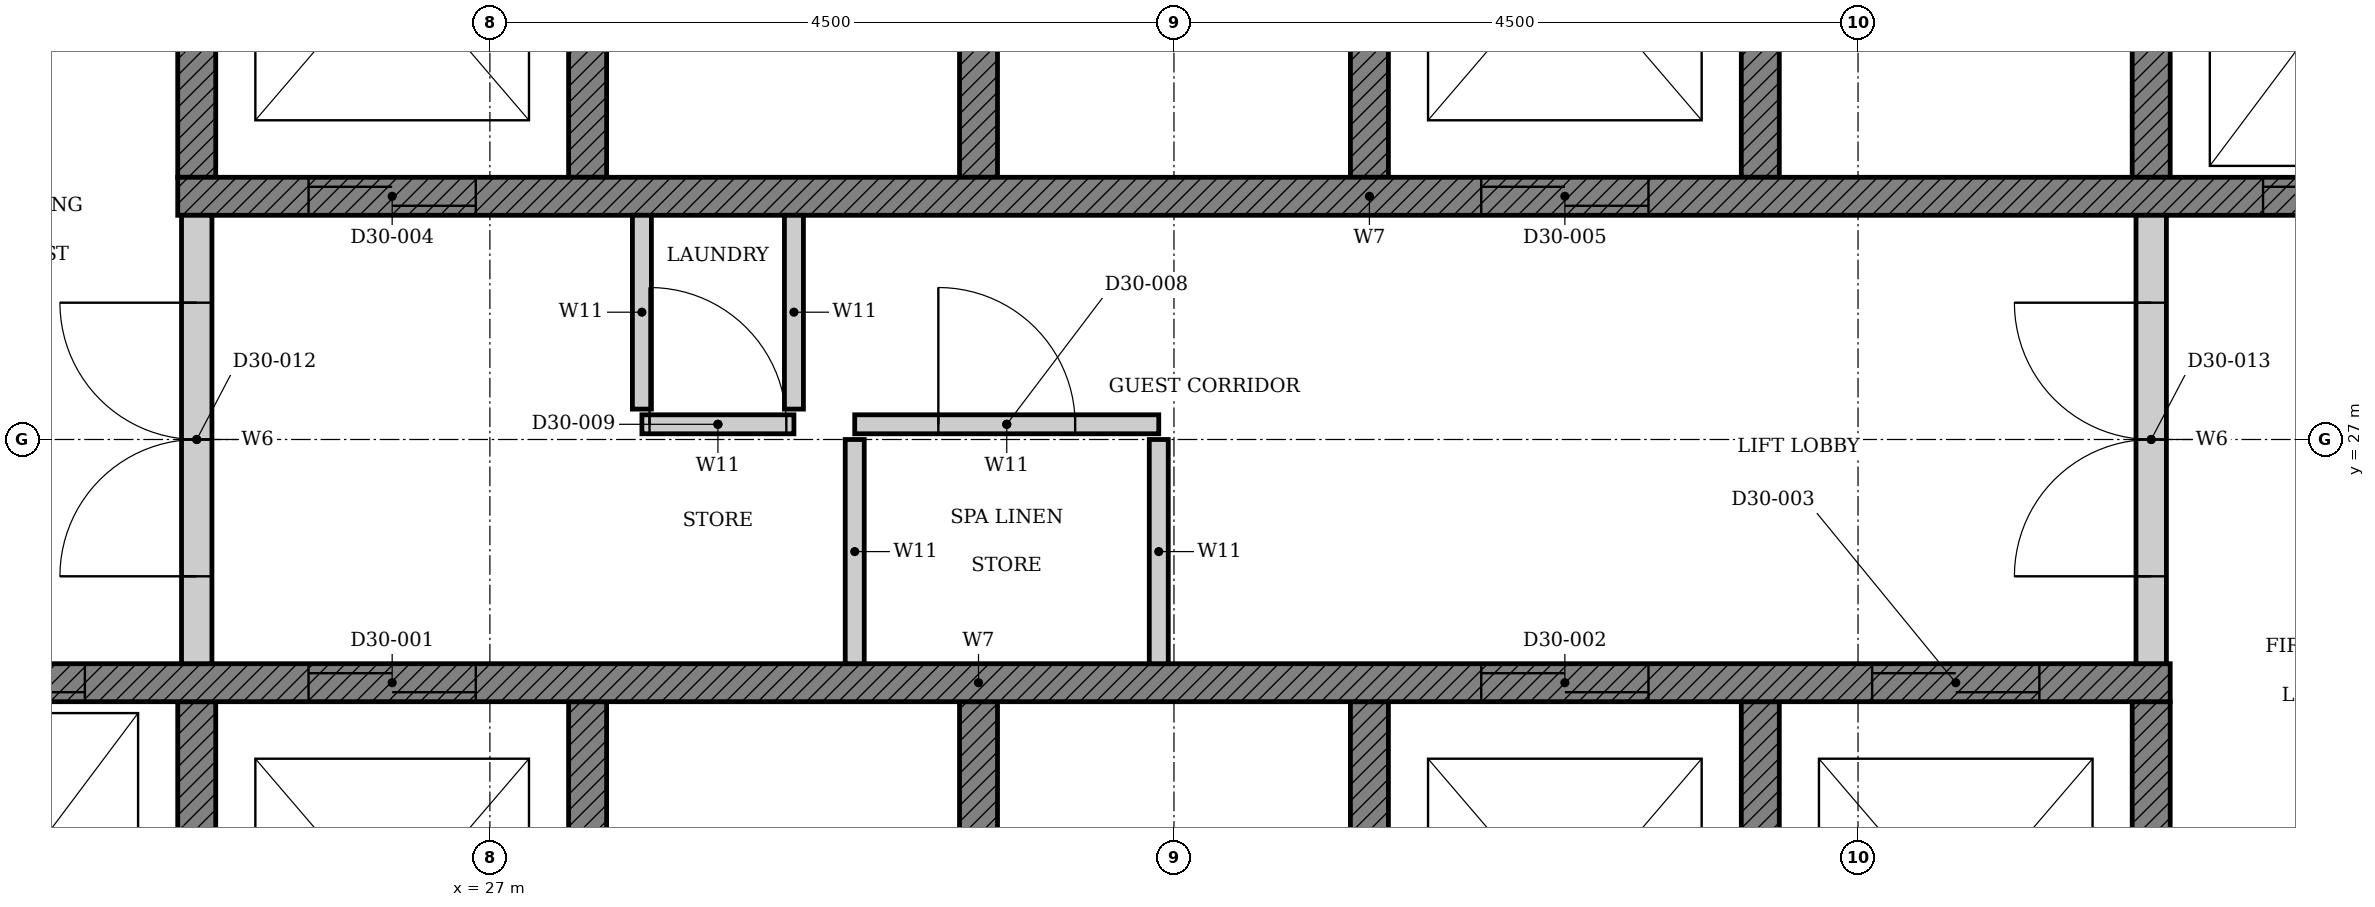
"""IFC4 building model, lengths in metres.
Left out: names, types, materials, properties, quantities, classifications, styles, units other than length and angle.
Written with IfcOpenShell. Run it as: python <this file> out.ifc"""

import sys

from ifc_helpers import new_model, si_unit, direction, frame, frame_2d, origin, place, context, subcontext, project, spatial, polyline, rectangle, outline, extrude, element, fill, save


model = new_model("IFC4")
c1 = context("Model", 3, precision=1e-05, world=origin(), true_north=direction((0.0, 1.0)))
c2 = subcontext(c1, "Body", "Model", "MODEL_VIEW")
j1 = project(units=[si_unit("LENGTHUNIT", "METRE"), si_unit("PLANEANGLEUNIT", "RADIAN")], contexts=[c1])
p1 = place(None, origin())
s1 = spatial("IfcSite", under=j1, at=p1, CompositionType="ELEMENT")
p2 = place(p1, origin())
s2 = spatial("IfcBuilding", under=s1, at=p2, CompositionType="ELEMENT")
p3 = place(p2, frame((0.0, 0.0, 122.4)))
s3 = spatial("IfcBuildingStorey", under=s2, at=p3, CompositionType="ELEMENT", Elevation=122.4)
p4 = place(p3, origin())
e1 = element("IfcWall", 1, at=p4, inside=s3, PredefinedType="SHEAR", context=c2, shape_type="SweptSolid", body=[
    extrude(outline(polyline([(22.375, 22.35), (38.053, 22.35), (38.053, 25.275), (37.803, 25.275), (37.803, 22.65), (35.482, 22.65), (35.482, 25.275), (35.232, 25.275), (35.232, 22.65), (32.911, 22.65), (32.911, 25.275), (32.661, 25.275), (32.661, 22.65), (30.339, 22.65), (30.339, 25.275), (30.089, 25.275), (30.089, 22.65), (27.768, 22.65), (27.768, 25.275), (27.518, 25.275), (27.518, 22.65), (25.197, 22.65), (25.197, 25.275), (24.947, 25.275), (24.947, 22.65), (22.625, 22.65), (22.625, 25.275), (22.375, 25.275), (22.375, 22.35)])), origin(), (0.0, 0.0, 1.0), 3.3),
])
p5 = place(p3, origin())
e2 = element("IfcWall", 2, at=p5, inside=s3, PredefinedType="SHEAR", context=c2, shape_type="SweptSolid", body=[
    extrude(outline(polyline([(24.947, 28.725), (25.197, 28.725), (25.197, 31.35), (27.518, 31.35), (27.518, 28.725), (27.768, 28.725), (27.768, 31.35), (30.089, 31.35), (30.089, 28.725), (30.339, 28.725), (30.339, 31.35), (32.661, 31.35), (32.661, 28.725), (32.911, 28.725), (32.911, 31.35), (35.232, 31.35), (35.232, 28.725), (35.482, 28.725), (35.482, 31.35), (37.803, 31.35), (37.803, 28.725), (38.053, 28.725), (38.053, 31.35), (40.375, 31.35), (40.375, 28.725), (40.625, 28.725), (40.625, 31.65), (24.947, 31.65), (24.947, 28.725)])), origin(), (0.0, 0.0, 1.0), 3.3),
])
p6 = place(p3, frame((22.375, 25.4, 0.0), z_axis=(0.0, 0.0, 1.0), x_axis=(1.0, 0.0, 0.0)))
e3 = element("IfcWall", 3, at=p6, inside=s3, PredefinedType="SHEAR", context=c2, shape_type="SweptSolid", body=[
    extrude(rectangle(XDim=15.678, YDim=0.25, at=frame_2d((7.839, 0.0))), origin(), (0.0, 0.0, 1.0), 3.3),
])
p7 = place(p6, frame((3.432, 0.0, 0.0)))
e4 = element("IfcOpeningElement", 4, at=p7, cuts=e3, PredefinedType="OPENING", context=c2, shape_type="SweptSolid", body=[
    extrude(rectangle(XDim=1.1, YDim=2.1, at=frame_2d((0.55, 1.05))), frame((0.0, 0.135, 0.0), z_axis=(0.0, -1.0, 0.0), x_axis=(1.0, 0.0, 0.0)), (0.0, 0.0, 1.0), 0.27),
])
p8 = place(p6, frame((11.146, 0.0, 0.0)))
e5 = element("IfcOpeningElement", 5, at=p8, cuts=e3, PredefinedType="OPENING", context=c2, shape_type="SweptSolid", body=[
    extrude(rectangle(XDim=1.1, YDim=2.1, at=frame_2d((0.55, 1.05))), frame((0.0, 0.135, 0.0), z_axis=(0.0, -1.0, 0.0), x_axis=(1.0, 0.0, 0.0)), (0.0, 0.0, 1.0), 0.27),
])
p9 = place(p6, frame((13.718, 0.0, 0.0)))
e6 = element("IfcOpeningElement", 6, at=p9, cuts=e3, PredefinedType="OPENING", context=c2, shape_type="SweptSolid", body=[
    extrude(rectangle(XDim=1.1, YDim=2.1, at=frame_2d((0.55, 1.05))), frame((0.0, 0.135, 0.0), z_axis=(0.0, -1.0, 0.0), x_axis=(1.0, 0.0, 0.0)), (0.0, 0.0, 1.0), 0.27),
])
p10 = place(p6, frame((0.861, 0.0, 0.0)))
e7 = element("IfcOpeningElement", 7, at=p10, cuts=e3, PredefinedType="OPENING", context=c2, shape_type="SweptSolid", body=[
    extrude(rectangle(XDim=1.1, YDim=2.1, at=frame_2d((0.55, 1.05))), frame((0.0, 0.135, 0.0), z_axis=(0.0, -1.0, 0.0), x_axis=(1.0, 0.0, 0.0)), (0.0, 0.0, 1.0), 0.27),
])
p11 = place(p3, frame((24.947, 28.6, 0.0), z_axis=(0.0, 0.0, 1.0), x_axis=(1.0, 0.0, 0.0)))
e8 = element("IfcWall", 8, at=p11, inside=s3, PredefinedType="SHEAR", context=c2, shape_type="SweptSolid", body=[
    extrude(rectangle(XDim=15.678, YDim=0.25, at=frame_2d((7.839, 0.0))), origin(), (0.0, 0.0, 1.0), 3.3),
])
p12 = place(p11, frame((0.861, 0.0, 0.0)))
e9 = element("IfcOpeningElement", 9, at=p12, cuts=e8, PredefinedType="OPENING", context=c2, shape_type="SweptSolid", body=[
    extrude(rectangle(XDim=1.1, YDim=2.1, at=frame_2d((0.55, 1.05))), frame((0.0, 0.135, 0.0), z_axis=(0.0, -1.0, 0.0), x_axis=(1.0, 0.0, 0.0)), (0.0, 0.0, 1.0), 0.27),
])
p13 = place(p11, frame((8.575, 0.0, 0.0)))
e10 = element("IfcOpeningElement", 10, at=p13, cuts=e8, PredefinedType="OPENING", context=c2, shape_type="SweptSolid", body=[
    extrude(rectangle(XDim=1.1, YDim=2.1, at=frame_2d((0.55, 1.05))), frame((0.0, 0.135, 0.0), z_axis=(0.0, -1.0, 0.0), x_axis=(1.0, 0.0, 0.0)), (0.0, 0.0, 1.0), 0.27),
])
p14 = place(p11, frame((13.718, 0.0, 0.0)))
e11 = element("IfcOpeningElement", 11, at=p14, cuts=e8, PredefinedType="OPENING", context=c2, shape_type="SweptSolid", body=[
    extrude(rectangle(XDim=1.1, YDim=2.1, at=frame_2d((0.55, 1.05))), frame((0.0, 0.135, 0.0), z_axis=(0.0, -1.0, 0.0), x_axis=(1.0, 0.0, 0.0)), (0.0, 0.0, 1.0), 0.27),
])
p15 = place(p3, frame((29.4, 27.1, 0.0), z_axis=(0.0, 0.0, 1.0), x_axis=(1.0, 0.0, 0.0)))
e12 = element("IfcWall", 12, at=p15, inside=s3, PredefinedType="PARTITIONING", context=c2, shape_type="SweptSolid", body=[
    extrude(rectangle(XDim=2.0, YDim=0.125, at=frame_2d((1.0, 0.0))), origin(), (0.0, 0.0, 1.0), 3.3),
])
p16 = place(p15, frame((0.55, 0.0, 0.0)))
e13 = element("IfcOpeningElement", 13, at=p16, cuts=e12, PredefinedType="OPENING", context=c2, shape_type="SweptSolid", body=[
    extrude(rectangle(XDim=0.9, YDim=2.1, at=frame_2d((0.45, 1.05))), frame((0.0, 0.073, 0.0), z_axis=(0.0, -1.0, 0.0), x_axis=(1.0, 0.0, 0.0)), (0.0, 0.0, 1.0), 0.145),
])
for number, where, z_axis, x_axis in (
    (14, (29.4, 25.525, 0.0), (0.0, 0.0, 1.0), (0.0, 1.0, 0.0)),
    (15, (31.4, 25.525, 0.0), (0.0, 0.0, 1.0), (0.0, 1.0, 0.0)),
):
    element("IfcWall", number, at=place(p3, frame(where, z_axis=z_axis, x_axis=x_axis)), inside=s3, PredefinedType="PARTITIONING", context=c2, shape_type="SweptSolid", body=[
        extrude(rectangle(XDim=1.475, YDim=0.125, at=frame_2d((0.738, 0.0))), origin(), (0.0, 0.0, 1.0), 3.3),
    ])
p17 = place(p3, frame((28.0, 27.1, 0.0), z_axis=(0.0, 0.0, 1.0), x_axis=(1.0, 0.0, 0.0)))
e16 = element("IfcWall", 16, at=p17, inside=s3, PredefinedType="PARTITIONING", context=c2, shape_type="SweptSolid", body=[
    extrude(rectangle(XDim=1.0, YDim=0.125, at=frame_2d((0.5, 0.0))), origin(), (0.0, 0.0, 1.0), 3.3),
])
p18 = place(p17, frame((0.05, 0.0, 0.0)))
e17 = element("IfcOpeningElement", 17, at=p18, cuts=e16, PredefinedType="OPENING", context=c2, shape_type="SweptSolid", body=[
    extrude(rectangle(XDim=0.9, YDim=2.1, at=frame_2d((0.45, 1.05))), frame((0.0, 0.073, 0.0), z_axis=(0.0, -1.0, 0.0), x_axis=(1.0, 0.0, 0.0)), (0.0, 0.0, 1.0), 0.145),
])
for number, where, z_axis, x_axis in (
    (18, (28.0, 28.475, 0.0), (0.0, 0.0, 1.0), (0.0, -1.0, 0.0)),
    (19, (29.0, 28.475, 0.0), (0.0, 0.0, 1.0), (0.0, -1.0, 0.0)),
):
    element("IfcWall", number, at=place(p3, frame(where, z_axis=z_axis, x_axis=x_axis)), inside=s3, PredefinedType="PARTITIONING", context=c2, shape_type="SweptSolid", body=[
        extrude(rectangle(XDim=1.275, YDim=0.125, at=frame_2d((0.638, 0.0))), origin(), (0.0, 0.0, 1.0), 3.3),
    ])
p19 = place(p3, frame((25.072, 25.525, 0.0), z_axis=(0.0, 0.0, 1.0), x_axis=(0.0, 1.0, 0.0)))
e20 = element("IfcWall", 20, at=p19, inside=s3, PredefinedType="PARTITIONING", context=c2, shape_type="SweptSolid", body=[
    extrude(rectangle(XDim=2.95, YDim=0.2, at=frame_2d((1.475, 0.0))), origin(), (0.0, 0.0, 1.0), 3.3),
])
p20 = place(p19, frame((0.575, 0.0, 0.0)))
e21 = element("IfcOpeningElement", 21, at=p20, cuts=e20, PredefinedType="OPENING", context=c2, shape_type="SweptSolid", body=[
    extrude(rectangle(XDim=1.8, YDim=2.1, at=frame_2d((0.9, 1.05))), frame((0.0, 0.11, 0.0), z_axis=(0.0, -1.0, 0.0), x_axis=(1.0, 0.0, 0.0)), (0.0, 0.0, 1.0), 0.22),
])
p21 = place(p3, frame((37.928, 25.525, 0.0), z_axis=(0.0, 0.0, 1.0), x_axis=(0.0, 1.0, 0.0)))
e22 = element("IfcWall", 22, at=p21, inside=s3, PredefinedType="PARTITIONING", context=c2, shape_type="SweptSolid", body=[
    extrude(rectangle(XDim=2.95, YDim=0.2, at=frame_2d((1.475, 0.0))), origin(), (0.0, 0.0, 1.0), 3.3),
])
p22 = place(p21, frame((0.575, 0.0, 0.0)))
e23 = element("IfcOpeningElement", 23, at=p22, cuts=e22, PredefinedType="OPENING", context=c2, shape_type="SweptSolid", body=[
    extrude(rectangle(XDim=1.8, YDim=2.1, at=frame_2d((0.9, 1.05))), frame((0.0, 0.11, 0.0), z_axis=(0.0, -1.0, 0.0), x_axis=(1.0, 0.0, 0.0)), (0.0, 0.0, 1.0), 0.22),
])
p23 = place(p7, origin())
e24 = element("IfcDoor", 24, at=p23, inside=s3, OperationType="DOUBLE_DOOR_SLIDING", PredefinedType="DOOR", context=c2, shape_type="SweptSolid", body=[
    extrude(rectangle(XDim=1.1, YDim=2.1, at=frame_2d((0.55, 1.05))), frame((0.0, 0.025, 0.0), z_axis=(0.0, -1.0, 0.0), x_axis=(1.0, 0.0, 0.0)), (0.0, 0.0, 1.0), 0.05),
])
fill(e4, e24)
p24 = place(p8, origin())
e25 = element("IfcDoor", 25, at=p24, inside=s3, OperationType="DOUBLE_DOOR_SLIDING", PredefinedType="DOOR", context=c2, shape_type="SweptSolid", body=[
    extrude(rectangle(XDim=1.1, YDim=2.1, at=frame_2d((0.55, 1.05))), frame((0.0, 0.025, 0.0), z_axis=(0.0, -1.0, 0.0), x_axis=(1.0, 0.0, 0.0)), (0.0, 0.0, 1.0), 0.05),
])
fill(e5, e25)
p25 = place(p9, origin())
e26 = element("IfcDoor", 26, at=p25, inside=s3, OperationType="DOUBLE_DOOR_SLIDING", PredefinedType="DOOR", context=c2, shape_type="SweptSolid", body=[
    extrude(rectangle(XDim=1.1, YDim=2.1, at=frame_2d((0.55, 1.05))), frame((0.0, 0.025, 0.0), z_axis=(0.0, -1.0, 0.0), x_axis=(1.0, 0.0, 0.0)), (0.0, 0.0, 1.0), 0.05),
])
fill(e6, e26)
p26 = place(p12, origin())
e27 = element("IfcDoor", 27, at=p26, inside=s3, OperationType="DOUBLE_DOOR_SLIDING", PredefinedType="DOOR", context=c2, shape_type="SweptSolid", body=[
    extrude(rectangle(XDim=1.1, YDim=2.1, at=frame_2d((0.55, 1.05))), frame((0.0, 0.025, 0.0), z_axis=(0.0, -1.0, 0.0), x_axis=(1.0, 0.0, 0.0)), (0.0, 0.0, 1.0), 0.05),
])
fill(e9, e27)
p27 = place(p13, origin())
e28 = element("IfcDoor", 28, at=p27, inside=s3, OperationType="DOUBLE_DOOR_SLIDING", PredefinedType="DOOR", context=c2, shape_type="SweptSolid", body=[
    extrude(rectangle(XDim=1.1, YDim=2.1, at=frame_2d((0.55, 1.05))), frame((0.0, 0.025, 0.0), z_axis=(0.0, -1.0, 0.0), x_axis=(1.0, 0.0, 0.0)), (0.0, 0.0, 1.0), 0.05),
])
fill(e10, e28)
p28 = place(p10, origin())
e29 = element("IfcDoor", 29, at=p28, inside=s3, OperationType="DOUBLE_DOOR_SLIDING", PredefinedType="DOOR", context=c2, shape_type="SweptSolid", body=[
    extrude(rectangle(XDim=1.1, YDim=2.1, at=frame_2d((0.55, 1.05))), frame((0.0, 0.025, 0.0), z_axis=(0.0, -1.0, 0.0), x_axis=(1.0, 0.0, 0.0)), (0.0, 0.0, 1.0), 0.05),
])
fill(e7, e29)
p29 = place(p14, origin())
e30 = element("IfcDoor", 30, at=p29, inside=s3, OperationType="DOUBLE_DOOR_SLIDING", PredefinedType="DOOR", context=c2, shape_type="SweptSolid", body=[
    extrude(rectangle(XDim=1.1, YDim=2.1, at=frame_2d((0.55, 1.05))), frame((0.0, 0.025, 0.0), z_axis=(0.0, -1.0, 0.0), x_axis=(1.0, 0.0, 0.0)), (0.0, 0.0, 1.0), 0.05),
])
fill(e11, e30)
p30 = place(p16, origin())
e31 = element("IfcDoor", 31, at=p30, inside=s3, OperationType="SINGLE_SWING_LEFT", PredefinedType="DOOR", context=c2, shape_type="SweptSolid", body=[
    extrude(rectangle(XDim=0.9, YDim=2.1, at=frame_2d((0.45, 1.05))), frame((0.0, 0.025, 0.0), z_axis=(0.0, -1.0, 0.0), x_axis=(1.0, 0.0, 0.0)), (0.0, 0.0, 1.0), 0.05),
])
fill(e13, e31)
p31 = place(p18, origin())
e32 = element("IfcDoor", 32, at=p31, inside=s3, OperationType="SINGLE_SWING_LEFT", PredefinedType="DOOR", context=c2, shape_type="SweptSolid", body=[
    extrude(rectangle(XDim=0.9, YDim=2.1, at=frame_2d((0.45, 1.05))), frame((0.0, 0.025, 0.0), z_axis=(0.0, -1.0, 0.0), x_axis=(1.0, 0.0, 0.0)), (0.0, 0.0, 1.0), 0.05),
])
fill(e17, e32)
p32 = place(p20, origin())
e33 = element("IfcDoor", 33, at=p32, inside=s3, OperationType="DOUBLE_DOOR_SINGLE_SWING", PredefinedType="DOOR", context=c2, shape_type="SweptSolid", body=[
    extrude(rectangle(XDim=1.8, YDim=2.1, at=frame_2d((0.9, 1.05))), frame((0.0, 0.025, 0.0), z_axis=(0.0, -1.0, 0.0), x_axis=(1.0, 0.0, 0.0)), (0.0, 0.0, 1.0), 0.05),
])
fill(e21, e33)
p33 = place(p22, origin())
e34 = element("IfcDoor", 34, at=p33, inside=s3, OperationType="DOUBLE_DOOR_SINGLE_SWING", PredefinedType="DOOR", context=c2, shape_type="SweptSolid", body=[
    extrude(rectangle(XDim=1.8, YDim=2.1, at=frame_2d((0.9, 1.05))), frame((0.0, 0.025, 0.0), z_axis=(0.0, -1.0, 0.0), x_axis=(1.0, 0.0, 0.0)), (0.0, 0.0, 1.0), 0.05),
])
fill(e23, e34)
save(model, sys.argv[1])
